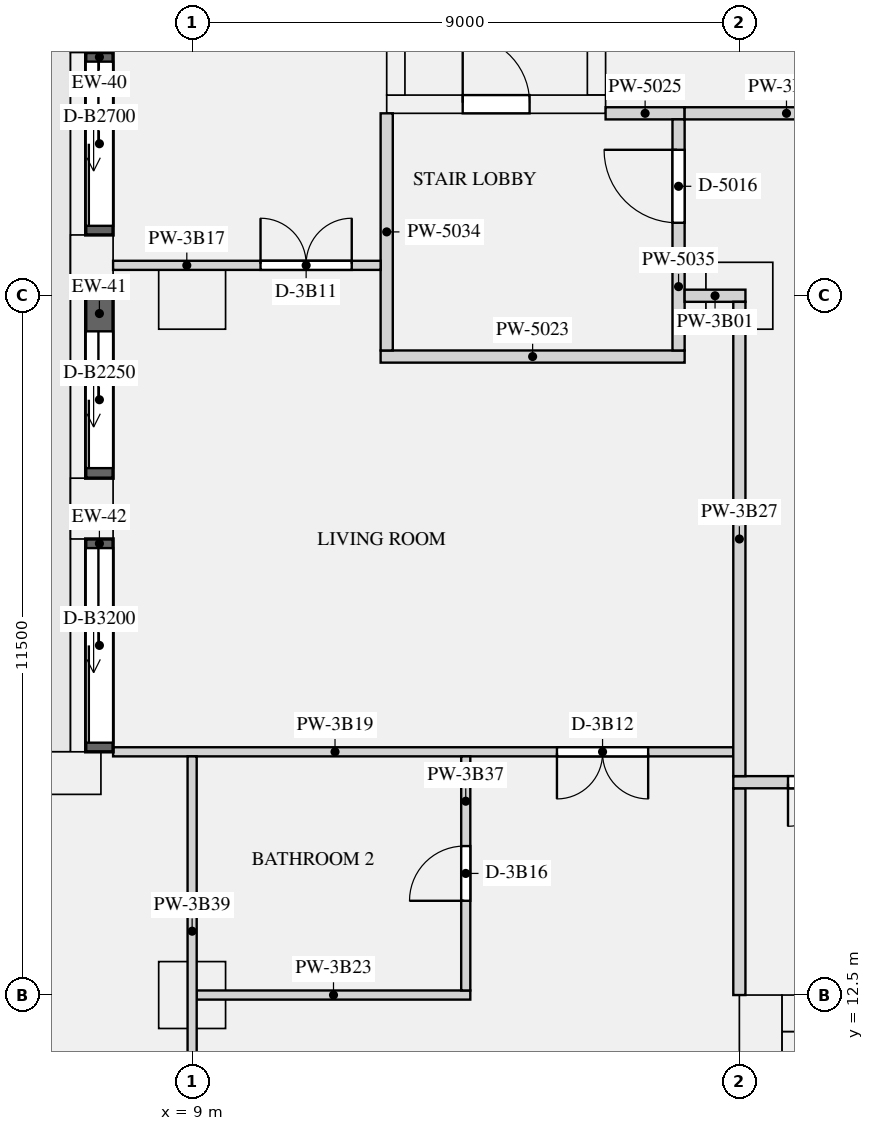
"""IFC4 building model, lengths in metres.
Left out: names, types, materials, properties, quantities, classifications, styles, units other than length and angle.
Written with IfcOpenShell. Run it as: python <this file> out.ifc"""

import sys

from ifc_helpers import new_model, si_unit, direction, frame, frame_2d, origin, origin_2d, place, context, subcontext, project, spatial, rectangle, extrude, element, fill, save


model = new_model("IFC4")
c1 = context("Model", 3, precision=1e-05, world=origin(), true_north=direction((0.0, 1.0)))
c2 = subcontext(c1, "Body", "Model", "MODEL_VIEW")
j1 = project(units=[si_unit("LENGTHUNIT", "METRE"), si_unit("PLANEANGLEUNIT", "RADIAN")], contexts=[c1])
p1 = place(None, origin())
s1 = spatial("IfcSite", under=j1, at=p1, CompositionType="ELEMENT")
p2 = place(p1, origin())
s2 = spatial("IfcBuilding", under=s1, at=p2, CompositionType="ELEMENT")
p3 = place(p2, frame((0.0, 0.0, 150.75)))
s3 = spatial("IfcBuildingStorey", under=s2, at=p3, CompositionType="ELEMENT", Elevation=150.75)
for number, where, z_axis, x_axis in (
    (1, (7.35, 24.5, 0.0), (0.0, 0.0, 1.0), (0.0, -1.0, 0.0)),
    (2, (7.35, 20.5, 0.0), (0.0, 0.0, 1.0), (0.0, -1.0, 0.0)),
    (3, (7.0, 16.15, 0.0), (0.0, 0.0, 1.0), (-1.0, 0.0, 0.0)),
):
    element("IfcColumn", number, at=place(p3, frame(where, z_axis=z_axis, x_axis=x_axis)), inside=s3, PredefinedType="USERDEFINED", context=c2, shape_type="SweptSolid", body=[
        extrude(rectangle(XDim=1.0, YDim=0.7, at=origin_2d()), origin(), (0.0, 0.0, 1.0), 3.15),
    ])
for number, where, z_axis, x_axis in (
    (4, (9.0, 24.0, 0.0), (0.0, 0.0, 1.0), (1.0, 0.0, 0.0)),
    (5, (18.0, 24.0, 0.0), (0.0, 0.0, 1.0), (1.0, 0.0, 0.0)),
    (6, (9.0, 12.5, 0.0), (0.0, 0.0, 1.0), (1.0, 0.0, 0.0)),
):
    element("IfcColumn", number, at=place(p3, frame(where, z_axis=z_axis, x_axis=x_axis)), inside=s3, PredefinedType="COLUMN", context=c2, shape_type="SweptSolid", body=[
        extrude(rectangle(XDim=1.1, YDim=1.1, at=origin_2d()), origin(), (0.0, 0.0, 1.0), 3.15),
    ])
p4 = place(p3, frame((18.35, 0.0, 0.0), z_axis=(0.0, 0.0, 1.0), x_axis=(0.0, 1.0, 0.0)))
e7 = element("IfcWall", 7, at=p4, inside=s3, PredefinedType="SHEAR", context=c2, shape_type="SweptSolid", body=[
    extrude(rectangle(XDim=12.5, YDim=0.7, at=frame_2d((6.25, 0.0))), origin(), (0.0, 0.0, 1.0), 3.15),
])
p5 = place(p3, frame((18.7, 12.2, 0.0), z_axis=(0.0, 0.0, 1.0), x_axis=(1.0, 0.0, 0.0)))
e8 = element("IfcWall", 8, at=p5, inside=s3, PredefinedType="SHEAR", context=c2, shape_type="SweptSolid", body=[
    extrude(rectangle(XDim=34.6, YDim=0.6, at=frame_2d((17.3, 0.0))), origin(), (0.0, 0.0, 1.0), 3.15),
])
p6 = place(p5, frame((24.475, 0.0, 0.0)))
e9 = element("IfcOpeningElement", 9, at=p6, cuts=e8, PredefinedType="OPENING", context=c2, shape_type="SweptSolid", body=[
    extrude(rectangle(XDim=1.1, YDim=2.1, at=frame_2d((0.55, 1.05))), frame((0.0, 0.31, 0.0), z_axis=(0.0, -1.0, 0.0), x_axis=(1.0, 0.0, 0.0)), (0.0, 0.0, 1.0), 0.62),
])
p7 = place(p5, frame((26.725, 0.0, 0.0)))
e10 = element("IfcOpeningElement", 10, at=p7, cuts=e8, PredefinedType="OPENING", context=c2, shape_type="SweptSolid", body=[
    extrude(rectangle(XDim=1.1, YDim=2.1, at=frame_2d((0.55, 1.05))), frame((0.0, 0.31, 0.0), z_axis=(0.0, -1.0, 0.0), x_axis=(1.0, 0.0, 0.0)), (0.0, 0.0, 1.0), 0.62),
])
p8 = place(p5, frame((28.975, 0.0, 0.0)))
e11 = element("IfcOpeningElement", 11, at=p8, cuts=e8, PredefinedType="OPENING", context=c2, shape_type="SweptSolid", body=[
    extrude(rectangle(XDim=1.1, YDim=2.1, at=frame_2d((0.55, 1.05))), frame((0.0, 0.31, 0.0), z_axis=(0.0, -1.0, 0.0), x_axis=(1.0, 0.0, 0.0)), (0.0, 0.0, 1.0), 0.62),
])
p9 = place(p5, frame((4.85, 0.0, 0.0)))
e12 = element("IfcOpeningElement", 12, at=p9, cuts=e8, PredefinedType="OPENING", context=c2, shape_type="SweptSolid", body=[
    extrude(rectangle(XDim=0.9, YDim=2.1, at=frame_2d((0.45, 1.05))), frame((0.0, 0.31, 0.0), z_axis=(0.0, -1.0, 0.0), x_axis=(1.0, 0.0, 0.0)), (0.0, 0.0, 1.0), 0.62),
])
p10 = place(p5, frame((18.35, 0.0, 0.0)))
e13 = element("IfcOpeningElement", 13, at=p10, cuts=e8, PredefinedType="OPENING", context=c2, shape_type="SweptSolid", body=[
    extrude(rectangle(XDim=0.9, YDim=2.1, at=frame_2d((0.45, 1.05))), frame((0.0, 0.31, 0.0), z_axis=(0.0, -1.0, 0.0), x_axis=(1.0, 0.0, 0.0)), (0.0, 0.0, 1.0), 0.62),
])
p11 = place(p5, frame((1.45, 0.0, 0.0)))
e14 = element("IfcOpeningElement", 14, at=p11, cuts=e8, PredefinedType="OPENING", context=c2, shape_type="SweptSolid", body=[
    extrude(rectangle(XDim=1.2, YDim=2.1, at=frame_2d((0.6, 1.05))), frame((0.0, 0.31, 0.0), z_axis=(0.0, -1.0, 0.0), x_axis=(1.0, 0.0, 0.0)), (0.0, 0.0, 1.0), 0.62),
])
p12 = place(p5, frame((31.95, 0.0, 0.0)))
e15 = element("IfcOpeningElement", 15, at=p12, cuts=e8, PredefinedType="OPENING", context=c2, shape_type="SweptSolid", body=[
    extrude(rectangle(XDim=1.2, YDim=2.1, at=frame_2d((0.6, 1.05))), frame((0.0, 0.31, 0.0), z_axis=(0.0, -1.0, 0.0), x_axis=(1.0, 0.0, 0.0)), (0.0, 0.0, 1.0), 0.62),
])
p13 = place(p3, frame((18.85, 1.0, 0.0), z_axis=(0.0, 0.0, 1.0), x_axis=(0.0, 1.0, 0.0)))
e16 = element("IfcWall", 16, at=p13, inside=s3, PredefinedType="SHEAR", context=c2, shape_type="SweptSolid", body=[
    extrude(rectangle(XDim=10.9, YDim=0.3, at=frame_2d((5.45, 0.0))), origin(), (0.0, 0.0, 1.0), 3.15),
])
p14 = place(p3, frame((12.2, 27.15, 0.0), z_axis=(0.0, 0.0, 1.0), x_axis=(1.0, 0.0, 0.0)))
e17 = element("IfcWall", 17, at=p14, inside=s3, PredefinedType="SHEAR", context=c2, shape_type="SweptSolid", body=[
    extrude(rectangle(XDim=3.6, YDim=0.3, at=frame_2d((1.8, 0.0))), origin(), (0.0, 0.0, 1.0), 3.15),
])
p15 = place(p14, frame((1.25, 0.0, 0.0)))
e18 = element("IfcOpeningElement", 18, at=p15, cuts=e17, PredefinedType="OPENING", context=c2, shape_type="SweptSolid", body=[
    extrude(rectangle(XDim=1.1, YDim=2.1, at=frame_2d((0.55, 1.05))), frame((0.0, 0.16, 0.0), z_axis=(0.0, -1.0, 0.0), x_axis=(1.0, 0.0, 0.0)), (0.0, 0.0, 1.0), 0.32),
])
for number, where, z_axis, x_axis in (
    (19, (12.35, 27.3, 0.0), (0.0, 0.0, 1.0), (0.0, 1.0, 0.0)),
    (20, (15.65, 27.3, 0.0), (0.0, 0.0, 1.0), (0.0, 1.0, 0.0)),
):
    element("IfcWall", number, at=place(p3, frame(where, z_axis=z_axis, x_axis=x_axis)), inside=s3, PredefinedType="SHEAR", context=c2, shape_type="SweptSolid", body=[
        extrude(rectangle(XDim=7.8, YDim=0.3, at=frame_2d((3.9, 0.0))), origin(), (0.0, 0.0, 1.0), 3.15),
    ])
p16 = place(p3, frame((7.475, 28.0, 0.0), z_axis=(0.0, 0.0, 1.0), x_axis=(0.0, -1.0, 0.0)))
e21 = element("IfcWall", 21, at=p16, inside=s3, PredefinedType="SOLIDWALL", context=c2, shape_type="SweptSolid", body=[
    extrude(rectangle(XDim=3.0, YDim=0.45, at=frame_2d((1.5, 0.0))), origin(), (0.0, 0.0, 1.0), 2.83),
])
p17 = place(p16, frame((0.15, 0.0, 0.0)))
e22 = element("IfcOpeningElement", 22, at=p17, cuts=e21, PredefinedType="OPENING", context=c2, shape_type="SweptSolid", body=[
    extrude(rectangle(XDim=2.7, YDim=2.3, at=frame_2d((1.35, 1.15))), frame((0.0, 0.235, 0.0), z_axis=(0.0, -1.0, 0.0), x_axis=(1.0, 0.0, 0.0)), (0.0, 0.0, 1.0), 0.47),
])
p18 = place(p3, frame((7.475, 24.0, 0.0), z_axis=(0.0, 0.0, 1.0), x_axis=(0.0, -1.0, 0.0)))
e23 = element("IfcWall", 23, at=p18, inside=s3, PredefinedType="SOLIDWALL", context=c2, shape_type="SweptSolid", body=[
    extrude(rectangle(XDim=3.0, YDim=0.45, at=frame_2d((1.5, 0.0))), origin(), (0.0, 0.0, 1.0), 2.83),
])
p19 = place(p18, frame((0.585, 0.0, 0.0)))
e24 = element("IfcOpeningElement", 24, at=p19, cuts=e23, PredefinedType="OPENING", context=c2, shape_type="SweptSolid", body=[
    extrude(rectangle(XDim=2.25, YDim=2.3, at=frame_2d((1.125, 1.15))), frame((0.0, 0.235, 0.0), z_axis=(0.0, -1.0, 0.0), x_axis=(1.0, 0.0, 0.0)), (0.0, 0.0, 1.0), 0.47),
])
p20 = place(p3, frame((7.475, 20.0, 0.0), z_axis=(0.0, 0.0, 1.0), x_axis=(0.0, -1.0, 0.0)))
e25 = element("IfcWall", 25, at=p20, inside=s3, PredefinedType="SOLIDWALL", context=c2, shape_type="SweptSolid", body=[
    extrude(rectangle(XDim=3.5, YDim=0.45, at=frame_2d((1.75, 0.0))), origin(), (0.0, 0.0, 1.0), 2.83),
])
p21 = place(p20, frame((0.15, 0.0, 0.0)))
e26 = element("IfcOpeningElement", 26, at=p21, cuts=e25, PredefinedType="OPENING", context=c2, shape_type="SweptSolid", body=[
    extrude(rectangle(XDim=3.2, YDim=2.3, at=frame_2d((1.6, 1.15))), frame((0.0, 0.235, 0.0), z_axis=(0.0, -1.0, 0.0), x_axis=(1.0, 0.0, 0.0)), (0.0, 0.0, 1.0), 0.47),
])
p22 = place(p3, frame((12.1, 23.0, 0.0), z_axis=(0.0, 0.0, 1.0), x_axis=(1.0, 0.0, 0.0)))
e27 = element("IfcWall", 27, at=p22, inside=s3, PredefinedType="PARTITIONING", context=c2, shape_type="SweptSolid", body=[
    extrude(rectangle(XDim=5.0, YDim=0.2, at=frame_2d((2.5, 0.0))), origin(), (0.0, 0.0, 1.0), 2.83),
])
p23 = place(p3, frame((15.8, 27.0, 0.0), z_axis=(0.0, 0.0, 1.0), x_axis=(1.0, 0.0, 0.0)))
e28 = element("IfcWall", 28, at=p23, inside=s3, PredefinedType="PARTITIONING", context=c2, shape_type="SweptSolid", body=[
    extrude(rectangle(XDim=1.3, YDim=0.2, at=frame_2d((0.65, 0.0))), origin(), (0.0, 0.0, 1.0), 2.83),
])
p24 = place(p3, frame((18.0, 12.5, 0.0), z_axis=(0.0, 0.0, 1.0), x_axis=(0.0, 1.0, 0.0)))
e29 = element("IfcWall", 29, at=p24, inside=s3, PredefinedType="PARTITIONING", context=c2, shape_type="SweptSolid", body=[
    extrude(rectangle(XDim=3.4, YDim=0.2, at=frame_2d((1.7, 0.0))), origin(), (0.0, 0.0, 1.0), 2.83),
])
p25 = place(p3, frame((12.2, 23.1, 0.0), z_axis=(0.0, 0.0, 1.0), x_axis=(0.0, 1.0, 0.0)))
e30 = element("IfcWall", 30, at=p25, inside=s3, PredefinedType="PARTITIONING", context=c2, shape_type="SweptSolid", body=[
    extrude(rectangle(XDim=3.9, YDim=0.2, at=frame_2d((1.95, 0.0))), origin(), (0.0, 0.0, 1.0), 2.83),
])
p26 = place(p3, frame((17.0, 23.1, 0.0), z_axis=(0.0, 0.0, 1.0), x_axis=(0.0, 1.0, 0.0)))
e31 = element("IfcWall", 31, at=p26, inside=s3, PredefinedType="PARTITIONING", context=c2, shape_type="SweptSolid", body=[
    extrude(rectangle(XDim=3.8, YDim=0.2, at=frame_2d((1.9, 0.0))), origin(), (0.0, 0.0, 1.0), 2.83),
])
p27 = place(p26, frame((2.1, 0.0, 0.0)))
e32 = element("IfcOpeningElement", 32, at=p27, cuts=e31, PredefinedType="OPENING", context=c2, shape_type="SweptSolid", body=[
    extrude(rectangle(XDim=1.2, YDim=2.1, at=frame_2d((0.6, 1.05))), frame((0.0, 0.11, 0.0), z_axis=(0.0, -1.0, 0.0), x_axis=(1.0, 0.0, 0.0)), (0.0, 0.0, 1.0), 0.22),
])
p28 = place(p3, frame((17.1, 24.0, 0.0), z_axis=(0.0, 0.0, 1.0), x_axis=(1.0, 0.0, 0.0)))
e33 = element("IfcWall", 33, at=p28, inside=s3, PredefinedType="PARTITIONING", context=c2, shape_type="SweptSolid", body=[
    extrude(rectangle(XDim=1.0, YDim=0.2, at=frame_2d((0.5, 0.0))), origin(), (0.0, 0.0, 1.0), 2.83),
])
p29 = place(p3, frame((17.1, 27.0, 0.0), z_axis=(0.0, 0.0, 1.0), x_axis=(1.0, 0.0, 0.0)))
e34 = element("IfcWall", 34, at=p29, inside=s3, PredefinedType="PARTITIONING", context=c2, shape_type="SweptSolid", body=[
    extrude(rectangle(XDim=7.0, YDim=0.2, at=frame_2d((3.5, 0.0))), origin(), (0.0, 0.0, 1.0), 2.83),
])
p30 = place(p29, frame((3.35, 0.0, 0.0)))
e35 = element("IfcOpeningElement", 35, at=p30, cuts=e34, PredefinedType="OPENING", context=c2, shape_type="SweptSolid", body=[
    extrude(rectangle(XDim=1.1, YDim=2.1, at=frame_2d((0.55, 1.05))), frame((0.0, 0.11, 0.0), z_axis=(0.0, -1.0, 0.0), x_axis=(1.0, 0.0, 0.0)), (0.0, 0.0, 1.0), 0.22),
])
p31 = place(p3, frame((7.7, 24.5, 0.0), z_axis=(0.0, 0.0, 1.0), x_axis=(1.0, 0.0, 0.0)))
e36 = element("IfcWall", 36, at=p31, inside=s3, PredefinedType="PARTITIONING", context=c2, shape_type="SweptSolid", body=[
    extrude(rectangle(XDim=4.4, YDim=0.15, at=frame_2d((2.2, 0.0))), origin(), (0.0, 0.0, 1.0), 2.83),
])
p32 = place(p31, frame((2.425, 0.0, 0.0)))
e37 = element("IfcOpeningElement", 37, at=p32, cuts=e36, PredefinedType="OPENING", context=c2, shape_type="SweptSolid", body=[
    extrude(rectangle(XDim=1.5, YDim=2.1, at=frame_2d((0.75, 1.05))), frame((0.0, 0.085, 0.0), z_axis=(0.0, -1.0, 0.0), x_axis=(1.0, 0.0, 0.0)), (0.0, 0.0, 1.0), 0.17),
])
p33 = place(p3, frame((7.7, 16.5, 0.0), z_axis=(0.0, 0.0, 1.0), x_axis=(1.0, 0.0, 0.0)))
e38 = element("IfcWall", 38, at=p33, inside=s3, PredefinedType="PARTITIONING", context=c2, shape_type="SweptSolid", body=[
    extrude(rectangle(XDim=10.2, YDim=0.15, at=frame_2d((5.1, 0.0))), origin(), (0.0, 0.0, 1.0), 2.83),
])
p34 = place(p33, frame((7.3, 0.0, 0.0)))
e39 = element("IfcOpeningElement", 39, at=p34, cuts=e38, PredefinedType="OPENING", context=c2, shape_type="SweptSolid", body=[
    extrude(rectangle(XDim=1.5, YDim=2.1, at=frame_2d((0.75, 1.05))), frame((0.0, 0.085, 0.0), z_axis=(0.0, -1.0, 0.0), x_axis=(1.0, 0.0, 0.0)), (0.0, 0.0, 1.0), 0.17),
])
p35 = place(p3, frame((9.075, 12.5, 0.0), z_axis=(0.0, 0.0, 1.0), x_axis=(1.0, 0.0, 0.0)))
e40 = element("IfcWall", 40, at=p35, inside=s3, PredefinedType="PARTITIONING", context=c2, shape_type="SweptSolid", body=[
    extrude(rectangle(XDim=4.5, YDim=0.15, at=frame_2d((2.25, 0.0))), origin(), (0.0, 0.0, 1.0), 2.83),
])
p36 = place(p3, frame((17.9, 16.0, 0.0), z_axis=(0.0, 0.0, 1.0), x_axis=(1.0, 0.0, 0.0)))
e41 = element("IfcWall", 41, at=p36, inside=s3, PredefinedType="PARTITIONING", context=c2, shape_type="SweptSolid", body=[
    extrude(rectangle(XDim=36.2, YDim=0.2, at=frame_2d((18.1, 0.0))), origin(), (0.0, 0.0, 1.0), 2.83),
])
p37 = place(p36, frame((0.9, 0.0, 0.0)))
e42 = element("IfcOpeningElement", 42, at=p37, cuts=e41, PredefinedType="OPENING", context=c2, shape_type="SweptSolid", body=[
    extrude(rectangle(XDim=1.4, YDim=2.1, at=frame_2d((0.7, 1.05))), frame((0.0, 0.11, 0.0), z_axis=(0.0, -1.0, 0.0), x_axis=(1.0, 0.0, 0.0)), (0.0, 0.0, 1.0), 0.22),
])
p38 = place(p36, frame((33.9, 0.0, 0.0)))
e43 = element("IfcOpeningElement", 43, at=p38, cuts=e41, PredefinedType="OPENING", context=c2, shape_type="SweptSolid", body=[
    extrude(rectangle(XDim=1.4, YDim=2.1, at=frame_2d((0.7, 1.05))), frame((0.0, 0.11, 0.0), z_axis=(0.0, -1.0, 0.0), x_axis=(1.0, 0.0, 0.0)), (0.0, 0.0, 1.0), 0.22),
])
p39 = place(p3, frame((18.0, 16.1, 0.0), z_axis=(0.0, 0.0, 1.0), x_axis=(0.0, 1.0, 0.0)))
e44 = element("IfcWall", 44, at=p39, inside=s3, PredefinedType="PARTITIONING", context=c2, shape_type="SweptSolid", body=[
    extrude(rectangle(XDim=7.8, YDim=0.2, at=frame_2d((3.9, 0.0))), origin(), (0.0, 0.0, 1.0), 2.83),
])
p40 = place(p3, frame((13.5, 12.575, 0.0), z_axis=(0.0, 0.0, 1.0), x_axis=(0.0, 1.0, 0.0)))
e45 = element("IfcWall", 45, at=p40, inside=s3, PredefinedType="PARTITIONING", context=c2, shape_type="SweptSolid", body=[
    extrude(rectangle(XDim=3.85, YDim=0.15, at=frame_2d((1.925, 0.0))), origin(), (0.0, 0.0, 1.0), 2.83),
])
p41 = place(p40, frame((1.475, 0.0, 0.0)))
e46 = element("IfcOpeningElement", 46, at=p41, cuts=e45, PredefinedType="OPENING", context=c2, shape_type="SweptSolid", body=[
    extrude(rectangle(XDim=0.9, YDim=2.1, at=frame_2d((0.45, 1.05))), frame((0.0, 0.085, 0.0), z_axis=(0.0, -1.0, 0.0), x_axis=(1.0, 0.0, 0.0)), (0.0, 0.0, 1.0), 0.17),
])
p42 = place(p3, frame((9.0, 5.2, 0.0), z_axis=(0.0, 0.0, 1.0), x_axis=(0.0, 1.0, 0.0)))
e47 = element("IfcWall", 47, at=p42, inside=s3, PredefinedType="PARTITIONING", context=c2, shape_type="SweptSolid", body=[
    extrude(rectangle(XDim=11.225, YDim=0.15, at=frame_2d((5.613, 0.0))), origin(), (0.0, 0.0, 1.0), 2.83),
])
p43 = place(p42, frame((4.575, 0.0, 0.0)))
e48 = element("IfcOpeningElement", 48, at=p43, cuts=e47, PredefinedType="OPENING", context=c2, shape_type="SweptSolid", body=[
    extrude(rectangle(XDim=0.9, YDim=2.1, at=frame_2d((0.45, 1.05))), frame((0.0, 0.085, 0.0), z_axis=(0.0, -1.0, 0.0), x_axis=(1.0, 0.0, 0.0)), (0.0, 0.0, 1.0), 0.17),
])
p44 = place(p17, origin())
e49 = element("IfcDoor", 49, at=p44, inside=s3, OperationType="SLIDING_TO_LEFT", PredefinedType="DOOR", context=c2, shape_type="SweptSolid", body=[
    extrude(rectangle(XDim=2.7, YDim=2.3, at=frame_2d((1.35, 1.15))), frame((0.0, -0.07, 0.0), z_axis=(0.0, -1.0, 0.0), x_axis=(1.0, 0.0, 0.0)), (0.0, 0.0, 1.0), 0.05),
])
fill(e22, e49)
p45 = place(p19, origin())
e50 = element("IfcDoor", 50, at=p45, inside=s3, OperationType="SLIDING_TO_LEFT", PredefinedType="DOOR", context=c2, shape_type="SweptSolid", body=[
    extrude(rectangle(XDim=2.25, YDim=2.3, at=frame_2d((1.125, 1.15))), frame((0.0, -0.07, 0.0), z_axis=(0.0, -1.0, 0.0), x_axis=(1.0, 0.0, 0.0)), (0.0, 0.0, 1.0), 0.05),
])
fill(e24, e50)
p46 = place(p21, origin())
e51 = element("IfcDoor", 51, at=p46, inside=s3, OperationType="SLIDING_TO_LEFT", PredefinedType="DOOR", context=c2, shape_type="SweptSolid", body=[
    extrude(rectangle(XDim=3.2, YDim=2.3, at=frame_2d((1.6, 1.15))), frame((0.0, -0.07, 0.0), z_axis=(0.0, -1.0, 0.0), x_axis=(1.0, 0.0, 0.0)), (0.0, 0.0, 1.0), 0.05),
])
fill(e26, e51)
p47 = place(p15, origin())
e52 = element("IfcDoor", 52, at=p47, inside=s3, OperationType="SINGLE_SWING_LEFT", PredefinedType="DOOR", context=c2, shape_type="SweptSolid", body=[
    extrude(rectangle(XDim=1.1, YDim=2.1, at=frame_2d((0.55, 1.05))), frame((0.0, 0.025, 0.0), z_axis=(0.0, -1.0, 0.0), x_axis=(1.0, 0.0, 0.0)), (0.0, 0.0, 1.0), 0.05),
])
fill(e18, e52)
p48 = place(p27, origin())
e53 = element("IfcDoor", 53, at=p48, inside=s3, OperationType="SINGLE_SWING_RIGHT", PredefinedType="DOOR", context=c2, shape_type="SweptSolid", body=[
    extrude(rectangle(XDim=1.2, YDim=2.1, at=frame_2d((0.6, 1.05))), frame((0.0, 0.025, 0.0), z_axis=(0.0, -1.0, 0.0), x_axis=(1.0, 0.0, 0.0)), (0.0, 0.0, 1.0), 0.05),
])
fill(e32, e53)
p49 = place(p37, frame((1.4, 0.0, 0.0), z_axis=(0.0, 0.0, 1.0), x_axis=(-1.0, 0.0, 0.0)))
e54 = element("IfcDoor", 54, at=p49, inside=s3, OperationType="DOUBLE_DOOR_SINGLE_SWING", PredefinedType="DOOR", context=c2, shape_type="SweptSolid", body=[
    extrude(rectangle(XDim=1.4, YDim=2.1, at=frame_2d((0.7, 1.05))), frame((0.0, 0.025, 0.0), z_axis=(0.0, -1.0, 0.0), x_axis=(1.0, 0.0, 0.0)), (0.0, 0.0, 1.0), 0.05),
])
fill(e42, e54)
p50 = place(p32, origin())
e55 = element("IfcDoor", 55, at=p50, inside=s3, OperationType="DOUBLE_DOOR_SINGLE_SWING", PredefinedType="DOOR", context=c2, shape_type="SweptSolid", body=[
    extrude(rectangle(XDim=1.5, YDim=2.1, at=frame_2d((0.75, 1.05))), frame((0.0, 0.025, 0.0), z_axis=(0.0, -1.0, 0.0), x_axis=(1.0, 0.0, 0.0)), (0.0, 0.0, 1.0), 0.05),
])
fill(e37, e55)
p51 = place(p34, frame((1.5, 0.0, 0.0), z_axis=(0.0, 0.0, 1.0), x_axis=(-1.0, 0.0, 0.0)))
e56 = element("IfcDoor", 56, at=p51, inside=s3, OperationType="DOUBLE_DOOR_SINGLE_SWING", PredefinedType="DOOR", context=c2, shape_type="SweptSolid", body=[
    extrude(rectangle(XDim=1.5, YDim=2.1, at=frame_2d((0.75, 1.05))), frame((0.0, 0.025, 0.0), z_axis=(0.0, -1.0, 0.0), x_axis=(1.0, 0.0, 0.0)), (0.0, 0.0, 1.0), 0.05),
])
fill(e39, e56)
p52 = place(p41, origin())
e57 = element("IfcDoor", 57, at=p52, inside=s3, OperationType="SINGLE_SWING_LEFT", PredefinedType="DOOR", context=c2, shape_type="SweptSolid", body=[
    extrude(rectangle(XDim=0.9, YDim=2.1, at=frame_2d((0.45, 1.05))), frame((0.0, 0.025, 0.0), z_axis=(0.0, -1.0, 0.0), x_axis=(1.0, 0.0, 0.0)), (0.0, 0.0, 1.0), 0.05),
])
fill(e46, e57)
save(model, sys.argv[1])
